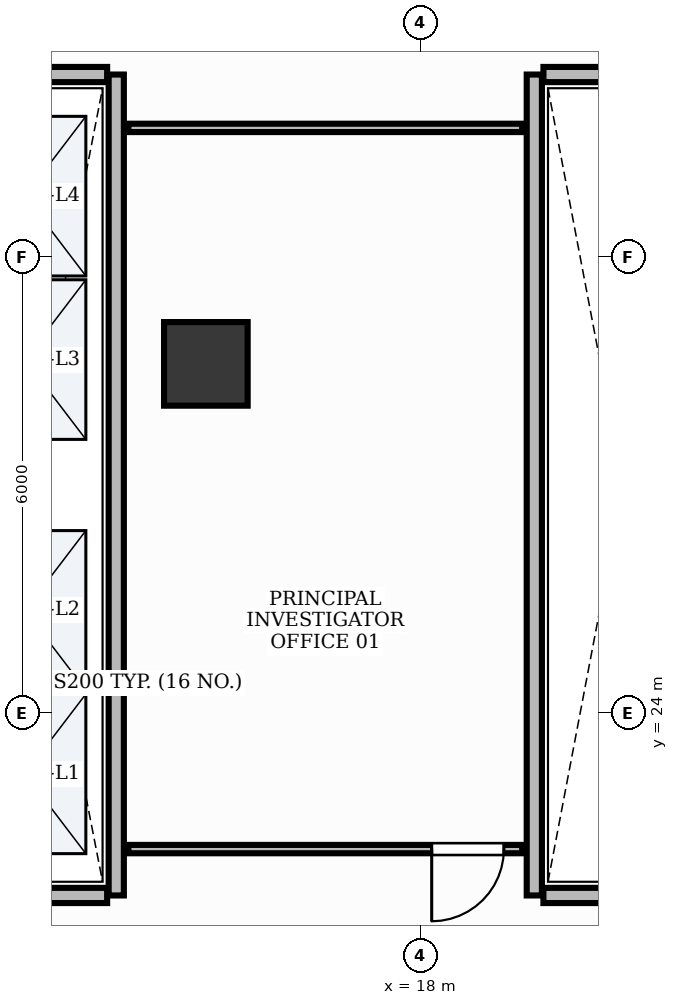
"""IFC4 building model, lengths in metres.
Left out: names, types, materials, properties, quantities, classifications, styles, units other than length and angle.
Written with IfcOpenShell. Run it as: python <this file> out.ifc"""

import sys

from ifc_helpers import new_model, si_unit, direction, frame, frame_2d, origin, origin_2d, place, context, subcontext, project, spatial, rectangle, extrude, element, fill, save


model = new_model("IFC4")
c1 = context("Model", 3, precision=1e-05, world=origin(), true_north=direction((0.0, 1.0)))
c2 = subcontext(c1, "Body", "Model", "MODEL_VIEW")
j1 = project(units=[si_unit("LENGTHUNIT", "METRE"), si_unit("PLANEANGLEUNIT", "RADIAN")], contexts=[c1])
p1 = place(None, origin())
s1 = spatial("IfcSite", under=j1, at=p1, CompositionType="ELEMENT")
p2 = place(p1, origin())
s2 = spatial("IfcBuilding", under=s1, at=p2, CompositionType="ELEMENT")
p3 = place(p2, frame((0.0, 0.0, 42.6)))
s3 = spatial("IfcBuildingStorey", under=s2, at=p3, CompositionType="ELEMENT", Elevation=42.6)
p4 = place(p3, frame((15.179, 28.594, -0.0), z_axis=(0.0, 0.0, 1.0), x_axis=(1.0, 0.0, 0.0)))
e1 = element("IfcColumn", 1, at=p4, inside=s3, PredefinedType="COLUMN", context=c2, shape_type="SweptSolid", body=[
    extrude(rectangle(XDim=1.1, YDim=1.1, at=origin_2d()), origin(), (0.0, 0.0, 1.0), 3.901),
])
p5 = place(p3, frame((14.0, 21.6, 0.0), z_axis=(0.0, 0.0, 1.0), x_axis=(0.0, 1.0, 0.0)))
e2 = element("IfcWall", 2, at=p5, inside=s3, PredefinedType="PARTITIONING", context=c2, shape_type="SweptSolid", body=[
    extrude(rectangle(XDim=10.8, YDim=0.2, at=frame_2d((5.4, 0.0))), origin(), (0.0, 0.0, 1.0), 2.91),
])
for number, where, z_axis, x_axis in (
    (3, (11.72, 21.6, 0.0), (0.0, 0.0, 1.0), (1.0, 0.0, 0.0)),
    (4, (11.72, 32.4, 0.0), (0.0, 0.0, 1.0), (1.0, 0.0, 0.0)),
):
    element("IfcWall", number, at=place(p3, frame(where, z_axis=z_axis, x_axis=x_axis)), inside=s3, PredefinedType="PARTITIONING", context=c2, shape_type="SweptSolid", body=[
        extrude(rectangle(XDim=2.16, YDim=0.2, at=frame_2d((1.08, 0.0))), origin(), (0.0, 0.0, 1.0), 2.91),
    ])
p6 = place(p3, frame((19.5, 21.6, 0.0), z_axis=(0.0, 0.0, 1.0), x_axis=(0.0, 1.0, 0.0)))
e5 = element("IfcWall", 5, at=p6, inside=s3, PredefinedType="PARTITIONING", context=c2, shape_type="SweptSolid", body=[
    extrude(rectangle(XDim=10.8, YDim=0.2, at=frame_2d((5.4, 0.0))), origin(), (0.0, 0.0, 1.0), 2.91),
])
for number, where, z_axis, x_axis in (
    (6, (19.62, 21.6, 0.0), (0.0, 0.0, 1.0), (1.0, 0.0, 0.0)),
    (7, (19.62, 32.4, 0.0), (0.0, 0.0, 1.0), (1.0, 0.0, 0.0)),
):
    element("IfcWall", number, at=place(p3, frame(where, z_axis=z_axis, x_axis=x_axis)), inside=s3, PredefinedType="PARTITIONING", context=c2, shape_type="SweptSolid", body=[
        extrude(rectangle(XDim=2.11, YDim=0.2, at=frame_2d((1.055, 0.0))), origin(), (0.0, 0.0, 1.0), 2.91),
    ])
p7 = place(p3, frame((19.34, 22.21, 0.0), z_axis=(0.0, 0.0, 1.0), x_axis=(-1.0, 0.0, 0.0)))
e8 = element("IfcWall", 8, at=p7, inside=s3, PredefinedType="MOVABLE", context=c2, shape_type="SweptSolid", body=[
    extrude(rectangle(XDim=5.18, YDim=0.11, at=frame_2d((2.59, 0.0))), origin(), (0.0, 0.0, 1.0), 2.91),
])
p8 = place(p7, frame((0.24, 0.0, 0.0)))
e9 = element("IfcOpeningElement", 9, at=p8, cuts=e8, PredefinedType="OPENING", context=c2, shape_type="SweptSolid", body=[
    extrude(rectangle(XDim=0.95, YDim=2.15, at=frame_2d((0.475, 1.075))), frame((0.0, 0.07, 0.0), z_axis=(0.0, -1.0, 0.0), x_axis=(1.0, 0.0, 0.0)), (0.0, 0.0, 1.0), 0.14),
])
p9 = place(p3, frame((14.16, 31.698, 0.0), z_axis=(0.0, 0.0, 1.0), x_axis=(1.0, 0.0, 0.0)))
e10 = element("IfcWall", 10, at=p9, inside=s3, PredefinedType="MOVABLE", context=c2, shape_type="SweptSolid", body=[
    extrude(rectangle(XDim=5.18, YDim=0.11, at=frame_2d((2.59, 0.0))), origin(), (0.0, 0.0, 1.0), 2.91),
])
p10 = place(p8, origin())
e11 = element("IfcDoor", 11, at=p10, inside=s3, OperationType="SINGLE_SWING_RIGHT", PredefinedType="DOOR", context=c2, shape_type="SweptSolid", body=[
    extrude(rectangle(XDim=0.95, YDim=2.15, at=frame_2d((0.475, 1.075))), frame((0.0, 0.025, 0.0), z_axis=(0.0, -1.0, 0.0), x_axis=(1.0, 0.0, 0.0)), (0.0, 0.0, 1.0), 0.05),
])
fill(e9, e11)
save(model, sys.argv[1])
